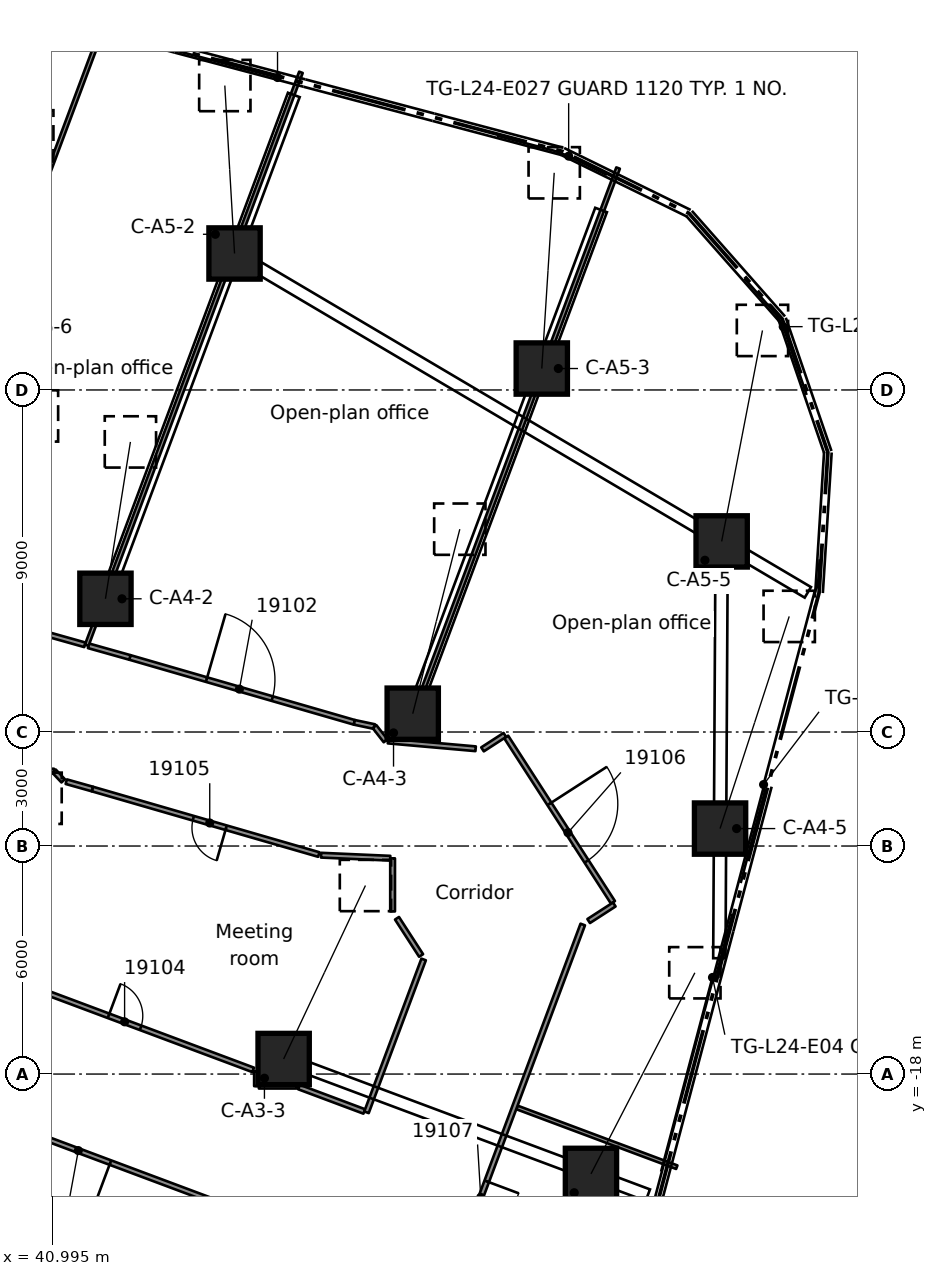
"""IFC4 building model, lengths in metres.
Left out: names, types, materials, properties, quantities, classifications, styles, units other than length and angle.
Written with IfcOpenShell. Run it as: python <this file> out.ifc"""

import sys

from ifc_helpers import new_model, si_unit, direction, frame, frame_2d, origin, origin_2d, place, context, subcontext, project, spatial, rectangle, extrude, element, fill, save


model = new_model("IFC4")
c1 = context("Model", 3, precision=1e-05, world=origin(), true_north=direction((0.0, 1.0)))
c2 = subcontext(c1, "Body", "Model", "MODEL_VIEW")
j1 = project(units=[si_unit("LENGTHUNIT", "METRE"), si_unit("PLANEANGLEUNIT", "RADIAN")], contexts=[c1])
p1 = place(None, origin())
s1 = spatial("IfcSite", under=j1, at=p1, CompositionType="ELEMENT")
p2 = place(p1, origin())
s2 = spatial("IfcBuilding", under=s1, at=p2, CompositionType="ELEMENT")
p3 = place(p2, frame((0.0, 0.0, 98.2)))
s3 = spatial("IfcBuildingStorey", under=s2, at=p3, CompositionType="ELEMENT", Elevation=98.2)
p4 = place(p3, frame((38.997, -14.58, 0.553), z_axis=(0.310782507683, 0.758869548286, 0.572303452377), x_axis=(-0.925403354822, 0.378983681555, 0.0)))
e1 = element("IfcColumn", 1, at=p4, inside=s3, PredefinedType="COLUMN", context=c2, shape_type="SweptSolid", body=[
    extrude(rectangle(XDim=1.35, YDim=1.35, at=origin_2d()), origin(), (0.0, 0.0, 1.0), 5.055),
])
p5 = place(p3, frame((47.083, -17.604, 0.589), z_axis=(0.372353666966, 0.789462395389, 0.487956835143), x_axis=(-0.904446734387, 0.42658657346, 0.0)))
e2 = element("IfcColumn", 2, at=p5, inside=s3, PredefinedType="COLUMN", context=c2, shape_type="SweptSolid", body=[
    extrude(rectangle(XDim=1.35, YDim=1.35, at=origin_2d()), origin(), (0.0, 0.0, 1.0), 5.782),
])
p6 = place(p3, frame((55.17, -20.627, 0.612), z_axis=(0.416038371719, 0.805254732153, 0.422465252539), x_axis=(-0.888430364054, 0.459011424942, 0.0)))
e3 = element("IfcColumn", 3, at=p6, inside=s3, PredefinedType="COLUMN", context=c2, shape_type="SweptSolid", body=[
    extrude(rectangle(XDim=1.35, YDim=1.35, at=origin_2d()), origin(), (0.0, 0.0, 1.0), 6.572),
])
p7 = place(p3, frame((42.394, -5.495, 0.555), z_axis=(0.129284388945, 0.812363334327, 0.568639921054), x_axis=(-0.987571860443, 0.157168128006, 0.0)))
e4 = element("IfcColumn", 4, at=p7, inside=s3, PredefinedType="COLUMN", context=c2, shape_type="SweptSolid", body=[
    extrude(rectangle(XDim=1.35, YDim=1.35, at=origin_2d()), origin(), (0.0, 0.0, 1.0), 5.082),
])
p8 = place(p3, frame((50.48, -8.518, 0.588), z_axis=(0.215420955051, 0.844110563968, 0.4909899876), x_axis=(-0.968944293567, 0.247279105393, 0.0)))
e5 = element("IfcColumn", 5, at=p8, inside=s3, PredefinedType="COLUMN", context=c2, shape_type="SweptSolid", body=[
    extrude(rectangle(XDim=1.35, YDim=1.35, at=origin_2d()), origin(), (0.0, 0.0, 1.0), 5.752),
])
p9 = place(p3, frame((58.567, -11.541, 0.61), z_axis=(0.280143722582, 0.859332883702, 0.427862699573), x_axis=(-0.950753812391, 0.309947073263, 0.0)))
e6 = element("IfcColumn", 6, at=p9, inside=s3, PredefinedType="COLUMN", context=c2, shape_type="SweptSolid", body=[
    extrude(rectangle(XDim=1.35, YDim=1.35, at=origin_2d()), origin(), (0.0, 0.0, 1.0), 6.497),
])
p10 = place(p3, frame((39.272, -4.327, 0.537), z_axis=(0.249154364941, 0.755002493761, 0.606542114651), x_axis=(-0.949627323304, 0.313381471748, 0.0)))
e7 = element("IfcColumn", 7, at=p10, inside=s3, PredefinedType="COLUMN", context=c2, shape_type="SweptSolid", body=[
    extrude(rectangle(XDim=1.35, YDim=1.35, at=origin_2d()), origin(), (0.0, 0.0, 1.0), 4.825),
])
p11 = place(p3, frame((45.791, 3.591, 0.567), z_axis=(-0.048562293401, 0.83791945715, 0.543629181509), x_axis=(-0.998324781517, -0.057858712476, 0.0)))
e8 = element("IfcColumn", 8, at=p11, inside=s3, PredefinedType="COLUMN", context=c2, shape_type="SweptSolid", body=[
    extrude(rectangle(XDim=1.35, YDim=1.35, at=origin_2d()), origin(), (0.0, 0.0, 1.0), 5.274),
])
p12 = place(p3, frame((53.876, 0.564, 0.593), z_axis=(0.055611757913, 0.876123997886, 0.478867489719), x_axis=(-0.997991544692, 0.063347270839, 0.0)))
e9 = element("IfcColumn", 9, at=p12, inside=s3, PredefinedType="COLUMN", context=c2, shape_type="SweptSolid", body=[
    extrude(rectangle(XDim=1.35, YDim=1.35, at=origin_2d()), origin(), (0.0, 0.0, 1.0), 5.878),
])
p13 = place(p3, frame((58.609, -3.985, 0.605), z_axis=(0.170386333784, 0.88047137983, 0.442423605337), x_axis=(-0.981785567068, 0.18999236905, 0.0)))
e10 = element("IfcColumn", 10, at=p13, inside=s3, PredefinedType="COLUMN", context=c2, shape_type="SweptSolid", body=[
    extrude(rectangle(XDim=1.35, YDim=1.35, at=origin_2d()), origin(), (0.0, 0.0, 1.0), 6.305),
])
p14 = place(p3, frame((39.876, 3.02, 0.528), z_axis=(0.100328455667, 0.775763177293, 0.622997346495), x_axis=(-0.991740509053, 0.128260526677, 0.0)))
e11 = element("IfcColumn", 11, at=p14, inside=s3, PredefinedType="COLUMN", context=c2, shape_type="SweptSolid", body=[
    extrude(rectangle(XDim=1.35, YDim=1.35, at=origin_2d()), origin(), (0.0, 0.0, 1.0), 4.726),
])
p15 = place(p3, frame((52.939, -9.13, 0.0), z_axis=(0.0, 0.0, 1.0), x_axis=(0.542438130709, -0.840095753086, 0.0)))
e12 = element("IfcWall", 12, at=p15, inside=s3, PredefinedType="PARTITIONING", context=c2, shape_type="SweptSolid", body=[
    extrude(rectangle(XDim=5.18, YDim=0.125, at=frame_2d((2.59, 0.0))), origin(), (0.0, 0.0, 1.0), 3.58),
])
p16 = place(p15, frame((2.097, 0.0, 0.0)))
e13 = element("IfcOpeningElement", 13, at=p16, cuts=e12, PredefinedType="OPENING", context=c2, shape_type="SweptSolid", body=[
    extrude(rectangle(XDim=1.8, YDim=2.1, at=frame_2d((0.9, 1.05))), frame((0.0, 0.073, 0.0), z_axis=(0.0, -1.0, 0.0), x_axis=(1.0, 0.0, 0.0)), (0.0, 0.0, 1.0), 0.145),
])
p17 = place(p3, frame((50.066, -13.901, 0.0), z_axis=(0.0, 0.0, 1.0), x_axis=(0.543589710843, -0.839351074501, 0.0)))
e14 = element("IfcWall", 14, at=p17, inside=s3, PredefinedType="PARTITIONING", context=c2, shape_type="SweptSolid", body=[
    extrude(rectangle(XDim=1.167, YDim=0.125, at=frame_2d((0.583, 0.0))), origin(), (0.0, 0.0, 1.0), 3.58),
])
p18 = place(p3, frame((45.614, -21.485, 0.0), z_axis=(0.0, 0.0, 1.0), x_axis=(-0.936670500211, 0.350211898761, 0.0)))
e15 = element("IfcWall", 15, at=p18, inside=s3, PredefinedType="PARTITIONING", context=c2, shape_type="SweptSolid", body=[
    extrude(rectangle(XDim=19.229, YDim=0.125, at=frame_2d((9.614, 0.0))), origin(), (0.0, 0.0, 1.0), 3.58),
])
p19 = place(p18, frame((15.8, 0.0, 0.0)))
e16 = element("IfcOpeningElement", 16, at=p19, cuts=e15, PredefinedType="OPENING", context=c2, shape_type="SweptSolid", body=[
    extrude(rectangle(XDim=1.8, YDim=2.1, at=frame_2d((0.9, 1.05))), frame((0.0, 0.073, 0.0), z_axis=(0.0, -1.0, 0.0), x_axis=(1.0, 0.0, 0.0)), (0.0, 0.0, 1.0), 0.145),
])
p20 = place(p18, frame((11.25, 0.0, 0.0)))
e17 = element("IfcOpeningElement", 17, at=p20, cuts=e15, PredefinedType="OPENING", context=c2, shape_type="SweptSolid", body=[
    extrude(rectangle(XDim=1.1, YDim=2.1, at=frame_2d((0.55, 1.05))), frame((0.0, 0.073, 0.0), z_axis=(0.0, -1.0, 0.0), x_axis=(1.0, 0.0, 0.0)), (0.0, 0.0, 1.0), 0.145),
])
p21 = place(p18, frame((3.3, 0.0, 0.0)))
e18 = element("IfcOpeningElement", 18, at=p21, cuts=e15, PredefinedType="OPENING", context=c2, shape_type="SweptSolid", body=[
    extrude(rectangle(XDim=1.8, YDim=2.1, at=frame_2d((0.9, 1.05))), frame((0.0, 0.073, 0.0), z_axis=(0.0, -1.0, 0.0), x_axis=(1.0, 0.0, 0.0)), (0.0, 0.0, 1.0), 0.145),
])
p22 = place(p3, frame((39.397, -15.317, 0.0), z_axis=(0.0, 0.0, 1.0), x_axis=(0.936687629124, -0.350166082662, 0.0)))
e19 = element("IfcWall", 19, at=p22, inside=s3, PredefinedType="PARTITIONING", context=c2, shape_type="SweptSolid", body=[
    extrude(rectangle(XDim=7.351, YDim=0.125, at=frame_2d((3.676, 0.0))), origin(), (0.0, 0.0, 1.0), 3.58),
])
p23 = place(p22, frame((3.288, 0.0, 0.0)))
e20 = element("IfcOpeningElement", 20, at=p23, cuts=e19, PredefinedType="OPENING", context=c2, shape_type="SweptSolid", body=[
    extrude(rectangle(XDim=0.9, YDim=2.1, at=frame_2d((0.45, 1.05))), frame((0.0, 0.073, 0.0), z_axis=(0.0, -1.0, 0.0), x_axis=(1.0, 0.0, 0.0)), (0.0, 0.0, 1.0), 0.145),
])
p24 = place(p3, frame((47.485, -18.341, 0.0), z_axis=(0.0, 0.0, 1.0), x_axis=(0.936651330255, -0.350263166107, 0.0)))
e21 = element("IfcWall", 21, at=p24, inside=s3, PredefinedType="PARTITIONING", context=c2, shape_type="SweptSolid", body=[
    extrude(rectangle(XDim=1.835, YDim=0.125, at=frame_2d((0.917, 0.0))), origin(), (0.0, 0.0, 1.0), 3.58),
])
p25 = place(p3, frame((53.222, -18.878, 0.0), z_axis=(0.0, 0.0, 1.0), x_axis=(0.936641604778, -0.350289172254, 0.0)))
e22 = element("IfcWall", 22, at=p25, inside=s3, PredefinedType="PARTITIONING", context=c2, shape_type="SweptSolid", body=[
    extrude(rectangle(XDim=4.49, YDim=0.1, at=frame_2d((2.245, 0.0))), origin(), (0.0, 0.0, 1.0), 3.58),
])
p26 = place(p3, frame((48.008, -12.224, 0.0), z_axis=(0.0, 0.0, 1.0), x_axis=(-0.960600770435, 0.277931933825, 0.0)))
e23 = element("IfcWall", 23, at=p26, inside=s3, PredefinedType="PARTITIONING", context=c2, shape_type="SweptSolid", body=[
    extrude(rectangle(XDim=6.203, YDim=0.125, at=frame_2d((3.102, 0.0))), origin(), (0.0, 0.0, 1.0), 3.58),
])
p27 = place(p26, frame((2.538, 0.0, 0.0)))
e24 = element("IfcOpeningElement", 24, at=p27, cuts=e23, PredefinedType="OPENING", context=c2, shape_type="SweptSolid", body=[
    extrude(rectangle(XDim=0.9, YDim=2.1, at=frame_2d((0.45, 1.05))), frame((0.0, 0.073, 0.0), z_axis=(0.0, -1.0, 0.0), x_axis=(1.0, 0.0, 0.0)), (0.0, 0.0, 1.0), 0.145),
])
p28 = place(p3, frame((43.037, -7.038, 0.0), z_axis=(0.0, 0.0, 1.0), x_axis=(0.960661918232, -0.277720504932, 0.0)))
e25 = element("IfcWall", 25, at=p28, inside=s3, PredefinedType="PARTITIONING", context=c2, shape_type="SweptSolid", body=[
    extrude(rectangle(XDim=6.146, YDim=0.125, at=frame_2d((3.073, 0.0))), origin(), (0.0, 0.0, 1.0), 3.58),
])
p29 = place(p28, frame((2.1, 0.0, 0.0)))
e26 = element("IfcOpeningElement", 26, at=p29, cuts=e25, PredefinedType="OPENING", context=c2, shape_type="SweptSolid", body=[
    extrude(rectangle(XDim=1.8, YDim=2.1, at=frame_2d((0.9, 1.05))), frame((0.0, 0.073, 0.0), z_axis=(0.0, -1.0, 0.0), x_axis=(1.0, 0.0, 0.0)), (0.0, 0.0, 1.0), 0.145),
])
p30 = place(p3, frame((41.363, -10.307, 0.0), z_axis=(0.0, 0.0, 1.0), x_axis=(0.962589533882, -0.270963815409, 0.0)))
e27 = element("IfcWall", 27, at=p30, inside=s3, PredefinedType="PARTITIONING", context=c2, shape_type="SweptSolid", body=[
    extrude(rectangle(XDim=0.713, YDim=0.125, at=frame_2d((0.356, 0.0))), origin(), (0.0, 0.0, 1.0), 3.58),
])
p31 = place(p3, frame((31.458, -3.782, 0.0), z_axis=(0.0, 0.0, 1.0), x_axis=(0.962639522341, -0.270786170301, 0.0)))
e28 = element("IfcWall", 28, at=p31, inside=s3, PredefinedType="PARTITIONING", context=c2, shape_type="SweptSolid", body=[
    extrude(rectangle(XDim=10.798, YDim=0.125, at=frame_2d((5.399, 0.0))), origin(), (0.0, 0.0, 1.0), 3.58),
])
p32 = place(p31, frame((2.288, 0.0, 0.0)))
e29 = element("IfcOpeningElement", 29, at=p32, cuts=e28, PredefinedType="OPENING", context=c2, shape_type="SweptSolid", body=[
    extrude(rectangle(XDim=1.1, YDim=2.1, at=frame_2d((0.55, 1.05))), frame((0.0, 0.073, 0.0), z_axis=(0.0, -1.0, 0.0), x_axis=(1.0, 0.0, 0.0)), (0.0, 0.0, 1.0), 0.145),
])
p33 = place(p31, frame((8.629, 0.0, 0.0)))
e30 = element("IfcOpeningElement", 30, at=p33, cuts=e28, PredefinedType="OPENING", context=c2, shape_type="SweptSolid", body=[
    extrude(rectangle(XDim=1.1, YDim=2.1, at=frame_2d((0.55, 1.05))), frame((0.0, 0.073, 0.0), z_axis=(0.0, -1.0, 0.0), x_axis=(1.0, 0.0, 0.0)), (0.0, 0.0, 1.0), 0.145),
])
p34 = place(p3, frame((41.949, -6.732, 0.0), z_axis=(0.0, 0.0, 1.0), x_axis=(0.962624548839, -0.270839395164, 0.0)))
e31 = element("IfcWall", 31, at=p34, inside=s3, PredefinedType="PARTITIONING", context=c2, shape_type="SweptSolid", body=[
    extrude(rectangle(XDim=1.13, YDim=0.125, at=frame_2d((0.565, 0.0))), origin(), (0.0, 0.0, 1.0), 3.58),
])
p35 = place(p3, frame((48.068, -12.241, 0.0), z_axis=(0.0, 0.0, 1.0), x_axis=(0.999033262009, -0.043960680164, 0.0)))
e32 = element("IfcWall", 32, at=p35, inside=s3, PredefinedType="PARTITIONING", context=c2, shape_type="SweptSolid", body=[
    extrude(rectangle(XDim=1.822, YDim=0.125, at=frame_2d((0.911, 0.0))), origin(), (0.0, 0.0, 1.0), 3.58),
])
p36 = place(p3, frame((48.942, -8.745, 0.0), z_axis=(0.0, 0.0, 1.0), x_axis=(0.978349703119, -0.206958591044, 0.0)))
e33 = element("IfcWall", 33, at=p36, inside=s3, PredefinedType="PARTITIONING", context=c2, shape_type="SweptSolid", body=[
    extrude(rectangle(XDim=0.545, YDim=0.125, at=frame_2d((0.272, 0.0))), origin(), (0.0, 0.0, 1.0), 3.58),
])
p37 = place(p3, frame((52.135, -9.441, 0.0), z_axis=(0.0, 0.0, 1.0), x_axis=(-0.996118984803, 0.088016862678, 0.0)))
e34 = element("IfcWall", 34, at=p37, inside=s3, PredefinedType="PARTITIONING", context=c2, shape_type="SweptSolid", body=[
    extrude(rectangle(XDim=2.316, YDim=0.125, at=frame_2d((1.158, 0.0))), origin(), (0.0, 0.0, 1.0), 3.58),
])
p38 = place(p3, frame((46.431, -18.318, 0.0), z_axis=(0.0, 0.0, 1.0), x_axis=(1.0, 0.0, 0.0)))
e35 = element("IfcWall", 35, at=p38, inside=s3, PredefinedType="PARTITIONING", context=c2, shape_type="SweptSolid", body=[
    extrude(rectangle(XDim=0.995, YDim=0.125, at=frame_2d((0.498, 0.0))), origin(), (0.0, 0.0, 1.0), 3.58),
])
p39 = place(p3, frame((40.374, -10.029, 0.0), z_axis=(0.0, 0.0, 1.0), x_axis=(1.0, 0.0, 0.0)))
e36 = element("IfcWall", 36, at=p39, inside=s3, PredefinedType="PARTITIONING", context=c2, shape_type="SweptSolid", body=[
    extrude(rectangle(XDim=0.666, YDim=0.125, at=frame_2d((0.333, 0.0))), origin(), (0.0, 0.0, 1.0), 3.58),
])
p40 = place(p3, frame((55.11, -13.974, 0.0), z_axis=(0.0, 0.0, 1.0), x_axis=(0.839553834588, 0.543276503107, 0.0)))
e37 = element("IfcWall", 37, at=p40, inside=s3, PredefinedType="PARTITIONING", context=c2, shape_type="SweptSolid", body=[
    extrude(rectangle(XDim=0.802, YDim=0.125, at=frame_2d((0.401, 0.0))), origin(), (0.0, 0.0, 1.0), 3.58),
])
p41 = place(p3, frame((52.316, -9.457, 0.0), z_axis=(0.0, 0.0, 1.0), x_axis=(0.839850650114, 0.542817543474, 0.0)))
e38 = element("IfcWall", 38, at=p41, inside=s3, PredefinedType="PARTITIONING", context=c2, shape_type="SweptSolid", body=[
    extrude(rectangle(XDim=0.7, YDim=0.125, at=frame_2d((0.35, 0.0))), origin(), (0.0, 0.0, 1.0), 3.58),
])
p42 = place(p3, frame((54.954, -14.065, 0.0), z_axis=(0.0, 0.0, 1.0), x_axis=(-0.350167821349, -0.936686979141, 0.0)))
e39 = element("IfcWall", 39, at=p42, inside=s3, PredefinedType="PARTITIONING", context=c2, shape_type="SweptSolid", body=[
    extrude(rectangle(XDim=10.221, YDim=0.125, at=frame_2d((5.111, 0.0))), origin(), (0.0, 0.0, 1.0), 3.58),
])
p43 = place(p42, frame((7.215, 0.0, 0.0)))
e40 = element("IfcOpeningElement", 40, at=p43, cuts=e39, PredefinedType="OPENING", context=c2, shape_type="SweptSolid", body=[
    extrude(rectangle(XDim=0.9, YDim=2.1, at=frame_2d((0.45, 1.05))), frame((0.0, 0.073, 0.0), z_axis=(0.0, -1.0, 0.0), x_axis=(1.0, 0.0, 0.0)), (0.0, 0.0, 1.0), 0.145),
])
p44 = place(p3, frame((49.263, -19.006, 0.0), z_axis=(0.0, 0.0, 1.0), x_axis=(0.350363010059, 0.936613987287, 0.0)))
e41 = element("IfcWall", 41, at=p44, inside=s3, PredefinedType="PARTITIONING", context=c2, shape_type="SweptSolid", body=[
    extrude(rectangle(XDim=4.293, YDim=0.125, at=frame_2d((2.146, 0.0))), origin(), (0.0, 0.0, 1.0), 3.58),
])
p45 = place(p3, frame((50.277, -9.158, 0.0), z_axis=(0.0, 0.0, 1.0), x_axis=(0.350194162307, 0.936677131506, 0.0)))
e42 = element("IfcWall", 42, at=p45, inside=s3, PredefinedType="PARTITIONING", context=c2, shape_type="SweptSolid", body=[
    extrude(rectangle(XDim=16.011, YDim=0.1, at=frame_2d((8.005, 0.0))), origin(), (0.0, 0.0, 1.0), 3.58),
])
p46 = place(p3, frame((41.901, -6.718, 0.0), z_axis=(0.0, 0.0, 1.0), x_axis=(0.35023728631, 0.936661007664, 0.0)))
e43 = element("IfcWall", 43, at=p46, inside=s3, PredefinedType="PARTITIONING", context=c2, shape_type="SweptSolid", body=[
    extrude(rectangle(XDim=16.095, YDim=0.1, at=frame_2d((8.048, 0.0))), origin(), (0.0, 0.0, 1.0), 3.58),
])
p47 = place(p3, frame((36.803, -5.22, 0.0), z_axis=(0.0, 0.0, 1.0), x_axis=(0.350173943888, 0.936684690289, 0.0)))
e44 = element("IfcWall", 44, at=p47, inside=s3, PredefinedType="PARTITIONING", context=c2, shape_type="SweptSolid", body=[
    extrude(rectangle(XDim=15.952, YDim=0.1, at=frame_2d((7.976, 0.0))), origin(), (0.0, 0.0, 1.0), 3.58),
])
p48 = place(p3, frame((49.95, -13.721, 0.0), z_axis=(0.0, 0.0, 1.0), x_axis=(0.0, 1.0, 0.0)))
e45 = element("IfcWall", 45, at=p48, inside=s3, PredefinedType="PARTITIONING", context=c2, shape_type="SweptSolid", body=[
    extrude(rectangle(XDim=1.397, YDim=0.125, at=frame_2d((0.698, 0.0))), origin(), (0.0, 0.0, 1.0), 3.58),
])
p49 = place(p3, frame((49.766, -9.232, 0.0), z_axis=(0.0, 0.0, 1.0), x_axis=(-0.614083266095, 0.789241244679, 0.0)))
e46 = element("IfcWall", 46, at=p49, inside=s3, PredefinedType="PARTITIONING", context=c2, shape_type="SweptSolid", body=[
    extrude(rectangle(XDim=0.474, YDim=0.125, at=frame_2d((0.237, 0.0))), origin(), (0.0, 0.0, 1.0), 3.58),
])
p50 = place(p3, frame((46.369, -18.318, 0.0), z_axis=(0.0, 0.0, 1.0), x_axis=(0.0, 1.0, 0.0)))
e47 = element("IfcWall", 47, at=p50, inside=s3, PredefinedType="PARTITIONING", context=c2, shape_type="SweptSolid", body=[
    extrude(rectangle(XDim=0.394, YDim=0.125, at=frame_2d((0.197, 0.0))), origin(), (0.0, 0.0, 1.0), 3.58),
])
p51 = place(p3, frame((41.282, -10.285, 0.0), z_axis=(0.0, 0.0, 1.0), x_axis=(-0.68707128389, 0.726590015658, 0.0)))
e48 = element("IfcWall", 48, at=p51, inside=s3, PredefinedType="PARTITIONING", context=c2, shape_type="SweptSolid", body=[
    extrude(rectangle(XDim=0.352, YDim=0.125, at=frame_2d((0.176, 0.0))), origin(), (0.0, 0.0, 1.0), 3.58),
])
p52 = place(p29, origin())
e49 = element("IfcDoor", 49, at=p52, inside=s3, OperationType="DOUBLE_DOOR_SINGLE_SWING", PredefinedType="DOOR", context=c2, shape_type="SweptSolid", body=[
    extrude(rectangle(XDim=1.8, YDim=2.1, at=frame_2d((0.9, 1.05))), frame((0.0, 0.025, 0.0), z_axis=(0.0, -1.0, 0.0), x_axis=(1.0, 0.0, 0.0)), (0.0, 0.0, 1.0), 0.05),
])
fill(e26, e49)
p53 = place(p23, origin())
e50 = element("IfcDoor", 50, at=p53, inside=s3, OperationType="SINGLE_SWING_RIGHT", PredefinedType="DOOR", context=c2, shape_type="SweptSolid", body=[
    extrude(rectangle(XDim=0.9, YDim=2.1, at=frame_2d((0.45, 1.05))), frame((0.0, 0.025, 0.0), z_axis=(0.0, -1.0, 0.0), x_axis=(1.0, 0.0, 0.0)), (0.0, 0.0, 1.0), 0.05),
])
fill(e20, e50)
p54 = place(p27, origin())
e51 = element("IfcDoor", 51, at=p54, inside=s3, OperationType="SINGLE_SWING_LEFT", PredefinedType="DOOR", context=c2, shape_type="SweptSolid", body=[
    extrude(rectangle(XDim=0.9, YDim=2.1, at=frame_2d((0.45, 1.05))), frame((0.0, 0.025, 0.0), z_axis=(0.0, -1.0, 0.0), x_axis=(1.0, 0.0, 0.0)), (0.0, 0.0, 1.0), 0.05),
])
fill(e24, e51)
p55 = place(p16, origin())
e52 = element("IfcDoor", 52, at=p55, inside=s3, OperationType="DOUBLE_DOOR_SINGLE_SWING", PredefinedType="DOOR", context=c2, shape_type="SweptSolid", body=[
    extrude(rectangle(XDim=1.8, YDim=2.1, at=frame_2d((0.9, 1.05))), frame((0.0, 0.025, 0.0), z_axis=(0.0, -1.0, 0.0), x_axis=(1.0, 0.0, 0.0)), (0.0, 0.0, 1.0), 0.05),
])
fill(e13, e52)
p56 = place(p43, origin())
e53 = element("IfcDoor", 53, at=p56, inside=s3, OperationType="SINGLE_SWING_RIGHT", PredefinedType="DOOR", context=c2, shape_type="SweptSolid", body=[
    extrude(rectangle(XDim=0.9, YDim=2.1, at=frame_2d((0.45, 1.05))), frame((0.0, 0.025, 0.0), z_axis=(0.0, -1.0, 0.0), x_axis=(1.0, 0.0, 0.0)), (0.0, 0.0, 1.0), 0.05),
])
fill(e40, e53)
p57 = place(p21, origin())
e54 = element("IfcDoor", 54, at=p57, inside=s3, OperationType="DOUBLE_DOOR_SINGLE_SWING", PredefinedType="DOOR", context=c2, shape_type="SweptSolid", body=[
    extrude(rectangle(XDim=1.8, YDim=2.1, at=frame_2d((0.9, 1.05))), frame((0.0, 0.025, 0.0), z_axis=(0.0, -1.0, 0.0), x_axis=(1.0, 0.0, 0.0)), (0.0, 0.0, 1.0), 0.05),
])
fill(e18, e54)
save(model, sys.argv[1])
